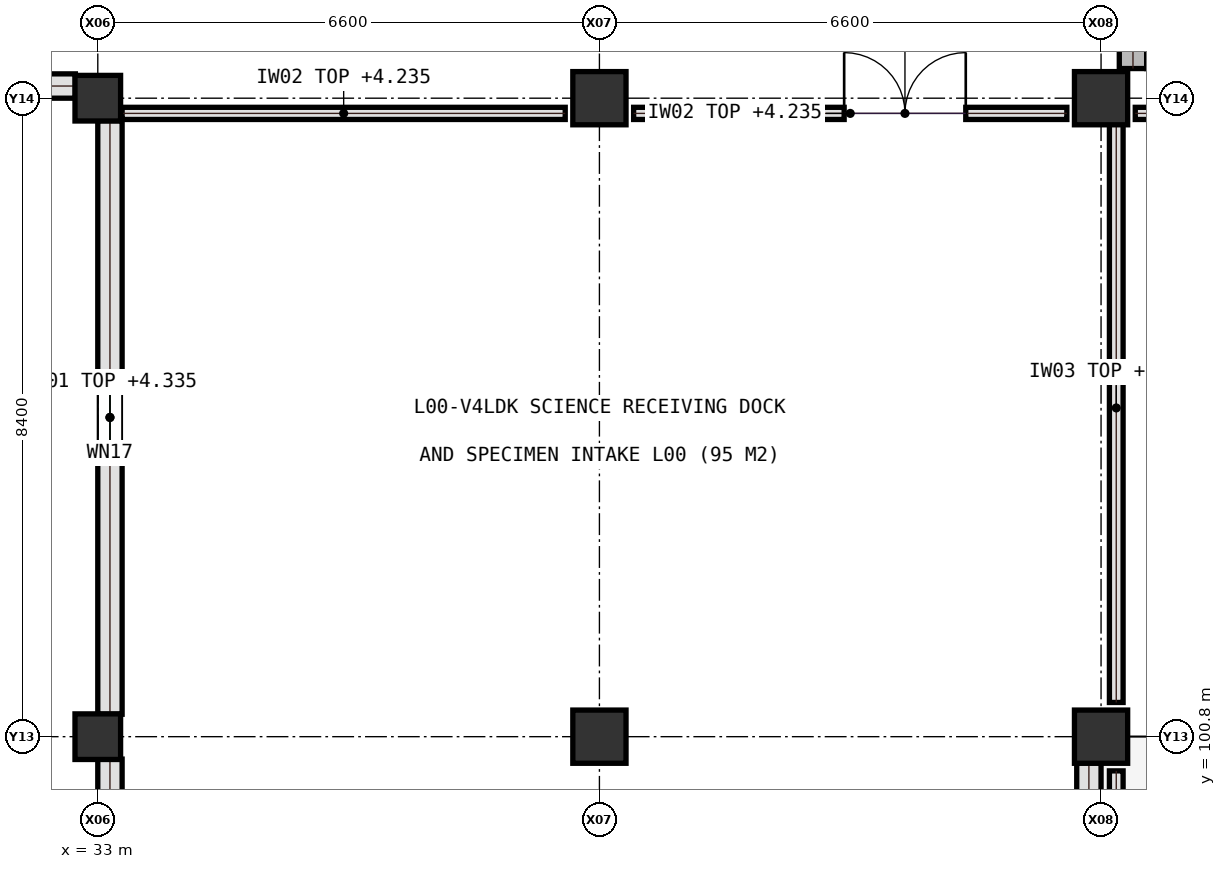
"""IFC4 building model, lengths in metres.
Left out: names, types, materials, properties, quantities, classifications, styles, units other than length and angle.
Written with IfcOpenShell. Run it as: python <this file> out.ifc"""

import sys

from ifc_helpers import new_model, si_unit, direction, frame, frame_2d, origin, origin_2d, place, context, subcontext, project, spatial, rectangle, extrude, element, fill, save


model = new_model("IFC4")
c1 = context("Model", 3, precision=1e-05, world=origin(), true_north=direction((0.0, 1.0)))
c2 = subcontext(c1, "Body", "Model", "MODEL_VIEW")
j1 = project(units=[si_unit("LENGTHUNIT", "METRE"), si_unit("PLANEANGLEUNIT", "RADIAN")], contexts=[c1])
p1 = place(None, origin())
s1 = spatial("IfcSite", under=j1, at=p1, CompositionType="ELEMENT")
p2 = place(p1, origin())
s2 = spatial("IfcBuilding", under=s1, at=p2, CompositionType="ELEMENT")
p3 = place(p2, origin())
s3 = spatial("IfcBuildingStorey", under=s2, at=p3, CompositionType="ELEMENT", Elevation=0.0)
for number, where, z_axis, x_axis in (
    (1, (33.0, 100.8, 0.0), (0.0, 0.0, 1.0), (1.0, 0.0, 0.0)),
    (2, (33.0, 109.2, 0.0), (0.0, 0.0, 1.0), (1.0, 0.0, 0.0)),
):
    element("IfcColumn", number, at=place(p3, frame(where, z_axis=z_axis, x_axis=x_axis)), inside=s3, PredefinedType="COLUMN", context=c2, shape_type="SweptSolid", body=[
        extrude(rectangle(XDim=0.6, YDim=0.6, at=origin_2d()), origin(), (0.0, 0.0, 1.0), 5.4),
    ])
for number, where, z_axis, x_axis in (
    (3, (39.6, 100.8, 0.0), (0.0, 0.0, 1.0), (1.0, 0.0, 0.0)),
    (4, (39.6, 109.2, 0.0), (0.0, 0.0, 1.0), (1.0, 0.0, 0.0)),
    (5, (46.2, 100.8, 0.0), (0.0, 0.0, 1.0), (1.0, 0.0, 0.0)),
    (6, (46.2, 109.2, 0.0), (0.0, 0.0, 1.0), (1.0, 0.0, 0.0)),
):
    element("IfcColumn", number, at=place(p3, frame(where, z_axis=z_axis, x_axis=x_axis)), inside=s3, PredefinedType="COLUMN", context=c2, shape_type="SweptSolid", body=[
        extrude(rectangle(XDim=0.7, YDim=0.7, at=origin_2d()), origin(), (0.0, 0.0, 1.0), 5.4),
    ])
p4 = place(p3, frame((33.32, 109.0, 0.0), z_axis=(0.0, 0.0, 1.0), x_axis=(1.0, 0.0, 0.0)))
e7 = element("IfcWall", 7, at=p4, inside=s3, PredefinedType="PARTITIONING", context=c2, shape_type="SweptSolid", body=[
    extrude(rectangle(XDim=5.83, YDim=0.16, at=frame_2d((2.915, 0.0))), origin(), (0.0, 0.0, 1.0), 4.235),
])
p5 = place(p3, frame((40.05, 109.0, 0.0), z_axis=(0.0, 0.0, 1.0), x_axis=(1.0, 0.0, 0.0)))
e8 = element("IfcWall", 8, at=p5, inside=s3, PredefinedType="PARTITIONING", context=c2, shape_type="SweptSolid", body=[
    extrude(rectangle(XDim=5.7, YDim=0.16, at=frame_2d((2.85, 0.0))), origin(), (0.0, 0.0, 1.0), 4.235),
])
p6 = place(p5, frame((2.77, 0.0, 0.0)))
e9 = element("IfcOpeningElement", 9, at=p6, cuts=e8, PredefinedType="OPENING", context=c2, shape_type="SweptSolid", body=[
    extrude(rectangle(XDim=1.6, YDim=2.2, at=frame_2d((0.8, 1.1))), frame((0.0, 0.09, 0.0), z_axis=(0.0, -1.0, 0.0), x_axis=(1.0, 0.0, 0.0)), (0.0, 0.0, 1.0), 0.18),
])
p7 = place(p3, frame((46.65, 109.0, 0.0), z_axis=(0.0, 0.0, 1.0), x_axis=(1.0, 0.0, 0.0)))
e10 = element("IfcWall", 10, at=p7, inside=s3, PredefinedType="PARTITIONING", context=c2, shape_type="SweptSolid", body=[
    extrude(rectangle(XDim=5.7, YDim=0.16, at=frame_2d((2.85, 0.0))), origin(), (0.0, 0.0, 1.0), 4.235),
])
p8 = place(p3, frame((46.4, 92.7, 0.0), z_axis=(0.0, 0.0, 1.0), x_axis=(0.0, 1.0, 0.0)))
e11 = element("IfcWall", 11, at=p8, inside=s3, PredefinedType="SOLIDWALL", context=c2, shape_type="SweptSolid", body=[
    extrude(rectangle(XDim=7.65, YDim=0.18, at=frame_2d((3.825, 0.0))), origin(), (0.0, 0.0, 1.0), 4.25),
])
p9 = place(p3, frame((46.4, 101.25, 0.0), z_axis=(0.0, 0.0, 1.0), x_axis=(0.0, 1.0, 0.0)))
e12 = element("IfcWall", 12, at=p9, inside=s3, PredefinedType="SOLIDWALL", context=c2, shape_type="SweptSolid", body=[
    extrude(rectangle(XDim=7.75, YDim=0.18, at=frame_2d((3.875, 0.0))), origin(), (0.0, 0.0, 1.0), 4.25),
])
p10 = place(p3, frame((26.62, 109.36, 0.0), z_axis=(0.0, 0.0, 1.0), x_axis=(1.0, 0.0, 0.0)))
e13 = element("IfcWall", 13, at=p10, inside=s3, PredefinedType="SOLIDWALL", context=c2, shape_type="SweptSolid", body=[
    extrude(rectangle(XDim=6.085, YDim=0.32, at=frame_2d((3.042, 0.0))), origin(), (0.0, 0.0, 1.0), 4.385),
])
p11 = place(p10, frame((1.39, 0.0, 1.35)))
e14 = element("IfcOpeningElement", 14, at=p11, cuts=e13, PredefinedType="OPENING", context=c2, shape_type="SweptSolid", body=[
    extrude(rectangle(XDim=3.3, YDim=1.05, at=frame_2d((1.65, 0.525))), frame((0.0, 0.17, 0.0), z_axis=(0.0, -1.0, 0.0), x_axis=(1.0, 0.0, 0.0)), (0.0, 0.0, 1.0), 0.34),
])
p12 = place(p3, frame((33.16, 100.505, 0.0), z_axis=(0.0, 0.0, 1.0), x_axis=(0.0, -1.0, 0.0)))
e15 = element("IfcWall", 15, at=p12, inside=s3, PredefinedType="SOLIDWALL", context=c2, shape_type="SweptSolid", body=[
    extrude(rectangle(XDim=7.81, YDim=0.32, at=frame_2d((3.905, 0.0))), origin(), (0.0, 0.0, 1.0), 4.335),
])
p13 = place(p12, frame((3.155, 0.0, 0.95)))
e16 = element("IfcOpeningElement", 16, at=p13, cuts=e15, PredefinedType="OPENING", context=c2, shape_type="SweptSolid", body=[
    extrude(rectangle(XDim=1.5, YDim=2.1, at=frame_2d((0.75, 1.05))), frame((0.0, 0.17, 0.0), z_axis=(0.0, -1.0, 0.0), x_axis=(1.0, 0.0, 0.0)), (0.0, 0.0, 1.0), 0.34),
])
p14 = place(p3, frame((33.16, 108.905, 0.0), z_axis=(0.0, 0.0, 1.0), x_axis=(0.0, -1.0, 0.0)))
e17 = element("IfcWall", 17, at=p14, inside=s3, PredefinedType="SOLIDWALL", context=c2, shape_type="SweptSolid", body=[
    extrude(rectangle(XDim=7.81, YDim=0.32, at=frame_2d((3.905, 0.0))), origin(), (0.0, 0.0, 1.0), 4.335),
])
p15 = place(p14, frame((3.38, 0.0, 0.95)))
e18 = element("IfcOpeningElement", 18, at=p15, cuts=e17, PredefinedType="OPENING", context=c2, shape_type="SweptSolid", body=[
    extrude(rectangle(XDim=1.05, YDim=1.75, at=frame_2d((0.525, 0.875))), frame((0.0, 0.17, 0.0), z_axis=(0.0, -1.0, 0.0), x_axis=(1.0, 0.0, 0.0)), (0.0, 0.0, 1.0), 0.34),
])
p16 = place(p3, frame((46.04, 92.695, 0.0), z_axis=(0.0, 0.0, 1.0), x_axis=(0.0, 1.0, 0.0)))
e19 = element("IfcWall", 19, at=p16, inside=s3, PredefinedType="SOLIDWALL", context=c2, shape_type="SweptSolid", body=[
    extrude(rectangle(XDim=7.76, YDim=0.32, at=frame_2d((3.88, 0.0))), origin(), (0.0, 0.0, 1.0), 4.335),
])
p17 = place(p16, frame((3.13, 0.0, 0.95)))
e20 = element("IfcOpeningElement", 20, at=p17, cuts=e19, PredefinedType="OPENING", context=c2, shape_type="SweptSolid", body=[
    extrude(rectangle(XDim=1.5, YDim=2.1, at=frame_2d((0.75, 1.05))), frame((0.0, 0.17, 0.0), z_axis=(0.0, -1.0, 0.0), x_axis=(1.0, 0.0, 0.0)), (0.0, 0.0, 1.0), 0.34),
])
p18 = place(p3, frame((46.62, 109.59, 0.0), z_axis=(0.0, 0.0, 1.0), x_axis=(0.0, 1.0, 0.0)))
e21 = element("IfcWall", 21, at=p18, inside=s3, PredefinedType="SHEAR", context=c2, shape_type="SweptSolid", body=[
    extrude(rectangle(XDim=7.84, YDim=0.36, at=frame_2d((3.92, 0.0))), origin(), (0.0, 0.0, 1.0), 5.1),
])
p19 = place(p6, origin())
e22 = element("IfcDoor", 22, at=p19, inside=s3, OperationType="DOUBLE_DOOR_SINGLE_SWING", PredefinedType="DOOR", context=c2, shape_type="SweptSolid", body=[
    extrude(rectangle(XDim=1.6, YDim=2.2, at=frame_2d((0.8, 1.1))), frame((0.0, 0.025, 0.0), z_axis=(0.0, -1.0, 0.0), x_axis=(1.0, 0.0, 0.0)), (0.0, 0.0, 1.0), 0.05),
])
fill(e9, e22)
p20 = place(p15, origin())
e23 = element("IfcWindow", 23, at=p20, inside=s3, PartitioningType="SINGLE_PANEL", PredefinedType="WINDOW", context=c2, shape_type="SweptSolid", body=[
    extrude(rectangle(XDim=1.05, YDim=1.75, at=frame_2d((0.525, 0.875))), frame((0.0, 0.03, 0.0), z_axis=(0.0, -1.0, 0.0), x_axis=(1.0, 0.0, 0.0)), (0.0, 0.0, 1.0), 0.06),
])
fill(e18, e23)
save(model, sys.argv[1])
